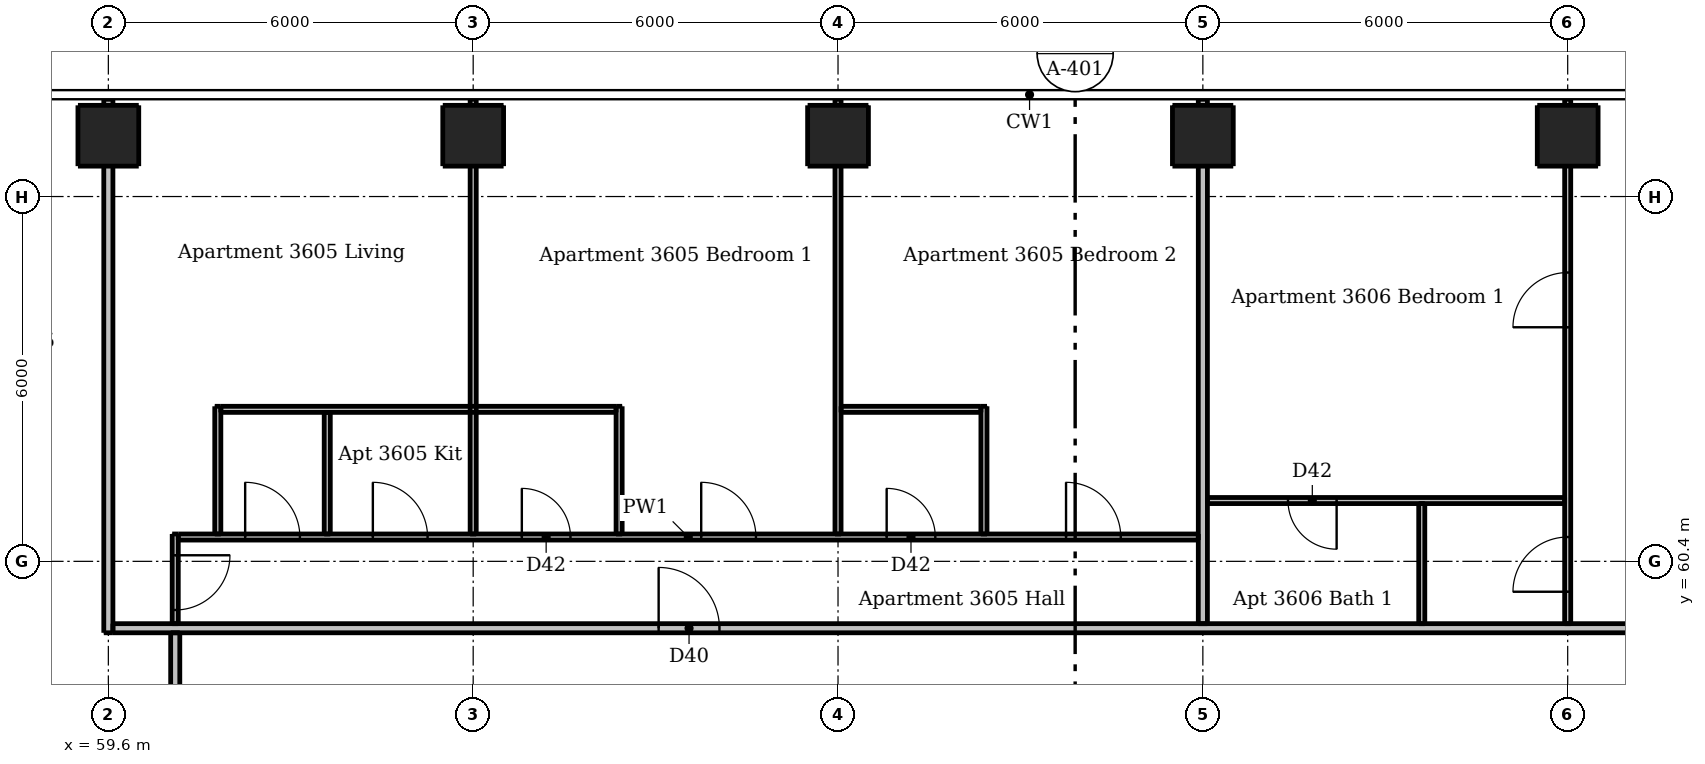
"""IFC4 building model, lengths in metres.
Left out: names, types, materials, properties, quantities, classifications, styles, units other than length and angle.
Written with IfcOpenShell. Run it as: python <this file> out.ifc"""

import sys

from ifc_helpers import new_model, si_unit, direction, frame, frame_2d, origin, origin_2d, place, context, subcontext, project, spatial, rectangle, extrude, element, fill, save


model = new_model("IFC4")
c1 = context("Model", 3, precision=1e-05, world=origin(), true_north=direction((0.0, 1.0)))
c2 = subcontext(c1, "Body", "Model", "MODEL_VIEW")
j1 = project(units=[si_unit("LENGTHUNIT", "METRE"), si_unit("PLANEANGLEUNIT", "RADIAN")], contexts=[c1])
p1 = place(None, origin())
s1 = spatial("IfcSite", under=j1, at=p1, CompositionType="ELEMENT")
p2 = place(p1, origin())
s2 = spatial("IfcBuilding", under=s1, at=p2, CompositionType="ELEMENT")
p3 = place(p2, frame((0.0, 0.0, 137.2)))
s3 = spatial("IfcBuildingStorey", under=s2, at=p3, CompositionType="ELEMENT", Elevation=137.2)
for number, where, z_axis, x_axis in (
    (1, (59.6, 67.4, 0.0), (0.0, 0.0, 1.0), (1.0, 0.0, 0.0)),
    (2, (65.6, 67.4, 0.0), (0.0, 0.0, 1.0), (1.0, 0.0, 0.0)),
    (3, (71.6, 67.4, 0.0), (0.0, 0.0, 1.0), (1.0, 0.0, 0.0)),
    (4, (77.6, 67.4, 0.0), (0.0, 0.0, 1.0), (1.0, 0.0, 0.0)),
    (5, (83.6, 67.4, 0.0), (0.0, 0.0, 1.0), (1.0, 0.0, 0.0)),
):
    element("IfcColumn", number, at=place(p3, frame(where, z_axis=z_axis, x_axis=x_axis)), inside=s3, PredefinedType="COLUMN", context=c2, shape_type="SweptSolid", body=[
        extrude(rectangle(XDim=1.0, YDim=1.0, at=origin_2d()), origin(), (0.0, 0.0, 1.0), 3.05),
    ])
p4 = place(p3, frame((60.7, 60.85, 0.0), z_axis=(0.0, 0.0, 1.0), x_axis=(0.0, -1.0, 0.0)))
e6 = element("IfcWall", 6, at=p4, inside=s3, PredefinedType="PARTITIONING", context=c2, shape_type="SweptSolid", body=[
    extrude(rectangle(XDim=1.475, YDim=0.1, at=frame_2d((0.738, 0.0))), origin(), (0.0, 0.0, 1.0), 3.05),
])
p5 = place(p4, frame((0.35, 0.0, 0.0)))
e7 = element("IfcOpeningElement", 7, at=p5, cuts=e6, PredefinedType="OPENING", context=c2, shape_type="SweptSolid", body=[
    extrude(rectangle(XDim=0.9, YDim=2.1, at=frame_2d((0.45, 1.05))), frame((0.0, 0.06, 0.0), z_axis=(0.0, -1.0, 0.0), x_axis=(1.0, 0.0, 0.0)), (0.0, 0.0, 1.0), 0.12),
])
p6 = place(p3, frame((61.4, 60.85, 0.0), z_axis=(0.0, 0.0, 1.0), x_axis=(0.0, 1.0, 0.0)))
e8 = element("IfcWall", 8, at=p6, inside=s3, PredefinedType="PARTITIONING", context=c2, shape_type="SweptSolid", body=[
    extrude(rectangle(XDim=2.1, YDim=0.1, at=frame_2d((1.05, 0.0))), origin(), (0.0, 0.0, 1.0), 3.05),
])
p7 = place(p3, frame((63.2, 60.85, 0.0), z_axis=(0.0, 0.0, 1.0), x_axis=(0.0, 1.0, 0.0)))
e9 = element("IfcWall", 9, at=p7, inside=s3, PredefinedType="PARTITIONING", context=c2, shape_type="SweptSolid", body=[
    extrude(rectangle(XDim=2.0, YDim=0.1, at=frame_2d((1.0, 0.0))), origin(), (0.0, 0.0, 1.0), 3.05),
])
p8 = place(p3, frame((65.6, 60.85, 0.0), z_axis=(0.0, 0.0, 1.0), x_axis=(0.0, 1.0, 0.0)))
e10 = element("IfcWall", 10, at=p8, inside=s3, PredefinedType="PARTITIONING", context=c2, shape_type="SweptSolid", body=[
    extrude(rectangle(XDim=7.15, YDim=0.1, at=frame_2d((3.575, 0.0))), origin(), (0.0, 0.0, 1.0), 2.516),
])
p9 = place(p3, frame((68.0, 60.85, 0.0), z_axis=(0.0, 0.0, 1.0), x_axis=(0.0, 1.0, 0.0)))
e11 = element("IfcWall", 11, at=p9, inside=s3, PredefinedType="PARTITIONING", context=c2, shape_type="SweptSolid", body=[
    extrude(rectangle(XDim=2.1, YDim=0.1, at=frame_2d((1.05, 0.0))), origin(), (0.0, 0.0, 1.0), 3.05),
])
p10 = place(p3, frame((71.6, 60.85, 0.0), z_axis=(0.0, 0.0, 1.0), x_axis=(0.0, 1.0, 0.0)))
e12 = element("IfcWall", 12, at=p10, inside=s3, PredefinedType="PARTITIONING", context=c2, shape_type="SweptSolid", body=[
    extrude(rectangle(XDim=7.15, YDim=0.1, at=frame_2d((3.575, 0.0))), origin(), (0.0, 0.0, 1.0), 2.516),
])
p11 = place(p3, frame((74.0, 60.85, 0.0), z_axis=(0.0, 0.0, 1.0), x_axis=(0.0, 1.0, 0.0)))
e13 = element("IfcWall", 13, at=p11, inside=s3, PredefinedType="PARTITIONING", context=c2, shape_type="SweptSolid", body=[
    extrude(rectangle(XDim=2.1, YDim=0.1, at=frame_2d((1.05, 0.0))), origin(), (0.0, 0.0, 1.0), 3.05),
])
p12 = place(p3, frame((81.2, 59.375, 0.0), z_axis=(0.0, 0.0, 1.0), x_axis=(0.0, 1.0, 0.0)))
e14 = element("IfcWall", 14, at=p12, inside=s3, PredefinedType="PARTITIONING", context=c2, shape_type="SweptSolid", body=[
    extrude(rectangle(XDim=1.975, YDim=0.1, at=frame_2d((0.988, 0.0))), origin(), (0.0, 0.0, 1.0), 3.05),
])
p13 = place(p3, frame((83.6, 59.375, 0.0), z_axis=(0.0, 0.0, 1.0), x_axis=(0.0, 1.0, 0.0)))
e15 = element("IfcWall", 15, at=p13, inside=s3, PredefinedType="PARTITIONING", context=c2, shape_type="SweptSolid", body=[
    extrude(rectangle(XDim=8.625, YDim=0.1, at=frame_2d((4.312, 0.0))), origin(), (0.0, 0.0, 1.0), 2.516),
])
p14 = place(p13, frame((0.525, 0.0, 0.0)))
e16 = element("IfcOpeningElement", 16, at=p14, cuts=e15, PredefinedType="OPENING", context=c2, shape_type="SweptSolid", body=[
    extrude(rectangle(XDim=0.9, YDim=2.1, at=frame_2d((0.45, 1.05))), frame((0.0, 0.06, 0.0), z_axis=(0.0, -1.0, 0.0), x_axis=(1.0, 0.0, 0.0)), (0.0, 0.0, 1.0), 0.12),
])
p15 = place(p13, frame((4.875, 0.0, 0.0)))
e17 = element("IfcOpeningElement", 17, at=p15, cuts=e15, PredefinedType="OPENING", context=c2, shape_type="SweptSolid", body=[
    extrude(rectangle(XDim=0.9, YDim=2.1, at=frame_2d((0.45, 1.05))), frame((0.0, 0.06, 0.0), z_axis=(0.0, -1.0, 0.0), x_axis=(1.0, 0.0, 0.0)), (0.0, 0.0, 1.0), 0.12),
])
p16 = place(p3, frame((61.45, 62.9, 0.0), z_axis=(0.0, 0.0, 1.0), x_axis=(1.0, 0.0, 0.0)))
e18 = element("IfcWall", 18, at=p16, inside=s3, PredefinedType="PARTITIONING", context=c2, shape_type="SweptSolid", body=[
    extrude(rectangle(XDim=6.5, YDim=0.1, at=frame_2d((3.25, 0.0))), origin(), (0.0, 0.0, 1.0), 3.05),
])
p17 = place(p3, frame((71.65, 62.9, 0.0), z_axis=(0.0, 0.0, 1.0), x_axis=(1.0, 0.0, 0.0)))
e19 = element("IfcWall", 19, at=p17, inside=s3, PredefinedType="PARTITIONING", context=c2, shape_type="SweptSolid", body=[
    extrude(rectangle(XDim=2.3, YDim=0.1, at=frame_2d((1.15, 0.0))), origin(), (0.0, 0.0, 1.0), 3.05),
])
p18 = place(p3, frame((83.55, 61.4, 0.0), z_axis=(0.0, 0.0, 1.0), x_axis=(-1.0, 0.0, 0.0)))
e20 = element("IfcWall", 20, at=p18, inside=s3, PredefinedType="PARTITIONING", context=c2, shape_type="SweptSolid", body=[
    extrude(rectangle(XDim=5.875, YDim=0.1, at=frame_2d((2.938, 0.0))), origin(), (0.0, 0.0, 1.0), 3.05),
])
p19 = place(p18, frame((3.75, 0.0, 0.0)))
e21 = element("IfcOpeningElement", 21, at=p19, cuts=e20, PredefinedType="OPENING", context=c2, shape_type="SweptSolid", body=[
    extrude(rectangle(XDim=0.8, YDim=2.1, at=frame_2d((0.4, 1.05))), frame((0.0, 0.06, 0.0), z_axis=(0.0, -1.0, 0.0), x_axis=(1.0, 0.0, 0.0)), (0.0, 0.0, 1.0), 0.12),
])
p20 = place(p3, frame((60.75, 60.8, 0.0), z_axis=(0.0, 0.0, 1.0), x_axis=(1.0, 0.0, 0.0)))
e22 = element("IfcWall", 22, at=p20, inside=s3, PredefinedType="PARTITIONING", context=c2, shape_type="SweptSolid", body=[
    extrude(rectangle(XDim=16.775, YDim=0.1, at=frame_2d((8.387, 0.0))), origin(), (0.0, 0.0, 1.0), 3.05),
])
p21 = place(p20, frame((3.2, 0.0, 0.0)))
e23 = element("IfcOpeningElement", 23, at=p21, cuts=e22, PredefinedType="OPENING", context=c2, shape_type="SweptSolid", body=[
    extrude(rectangle(XDim=0.9, YDim=2.1, at=frame_2d((0.45, 1.05))), frame((0.0, 0.06, 0.0), z_axis=(0.0, -1.0, 0.0), x_axis=(1.0, 0.0, 0.0)), (0.0, 0.0, 1.0), 0.12),
])
p22 = place(p20, frame((1.1, 0.0, 0.0)))
e24 = element("IfcOpeningElement", 24, at=p22, cuts=e22, PredefinedType="OPENING", context=c2, shape_type="SweptSolid", body=[
    extrude(rectangle(XDim=0.9, YDim=2.1, at=frame_2d((0.45, 1.05))), frame((0.0, 0.06, 0.0), z_axis=(0.0, -1.0, 0.0), x_axis=(1.0, 0.0, 0.0)), (0.0, 0.0, 1.0), 0.12),
])
p23 = place(p20, frame((8.6, 0.0, 0.0)))
e25 = element("IfcOpeningElement", 25, at=p23, cuts=e22, PredefinedType="OPENING", context=c2, shape_type="SweptSolid", body=[
    extrude(rectangle(XDim=0.9, YDim=2.1, at=frame_2d((0.45, 1.05))), frame((0.0, 0.06, 0.0), z_axis=(0.0, -1.0, 0.0), x_axis=(1.0, 0.0, 0.0)), (0.0, 0.0, 1.0), 0.12),
])
p24 = place(p20, frame((14.6, 0.0, 0.0)))
e26 = element("IfcOpeningElement", 26, at=p24, cuts=e22, PredefinedType="OPENING", context=c2, shape_type="SweptSolid", body=[
    extrude(rectangle(XDim=0.9, YDim=2.1, at=frame_2d((0.45, 1.05))), frame((0.0, 0.06, 0.0), z_axis=(0.0, -1.0, 0.0), x_axis=(1.0, 0.0, 0.0)), (0.0, 0.0, 1.0), 0.12),
])
p25 = place(p20, frame((5.65, 0.0, 0.0)))
e27 = element("IfcOpeningElement", 27, at=p25, cuts=e22, PredefinedType="OPENING", context=c2, shape_type="SweptSolid", body=[
    extrude(rectangle(XDim=0.8, YDim=2.1, at=frame_2d((0.4, 1.05))), frame((0.0, 0.06, 0.0), z_axis=(0.0, -1.0, 0.0), x_axis=(1.0, 0.0, 0.0)), (0.0, 0.0, 1.0), 0.12),
])
p26 = place(p20, frame((11.65, 0.0, 0.0)))
e28 = element("IfcOpeningElement", 28, at=p26, cuts=e22, PredefinedType="OPENING", context=c2, shape_type="SweptSolid", body=[
    extrude(rectangle(XDim=0.8, YDim=2.1, at=frame_2d((0.4, 1.05))), frame((0.0, 0.06, 0.0), z_axis=(0.0, -1.0, 0.0), x_axis=(1.0, 0.0, 0.0)), (0.0, 0.0, 1.0), 0.12),
])
p27 = place(p3, frame((59.6, 59.225, 0.0), z_axis=(0.0, 0.0, 1.0), x_axis=(0.0, 1.0, 0.0)))
e29 = element("IfcWall", 29, at=p27, inside=s3, PredefinedType="PARTITIONING", context=c2, shape_type="SweptSolid", body=[
    extrude(rectangle(XDim=8.775, YDim=0.15, at=frame_2d((4.387, 0.0))), origin(), (0.0, 0.0, 1.0), 2.51),
])
p28 = place(p3, frame((60.7, 30.325, 0.0), z_axis=(0.0, 0.0, 1.0), x_axis=(0.0, 1.0, 0.0)))
e30 = element("IfcWall", 30, at=p28, inside=s3, PredefinedType="PARTITIONING", context=c2, shape_type="SweptSolid", body=[
    extrude(rectangle(XDim=28.9, YDim=0.15, at=frame_2d((14.45, 0.0))), origin(), (0.0, 0.0, 1.0), 3.05),
])
p29 = place(p28, frame((9.225, 0.0, 0.0)))
e31 = element("IfcOpeningElement", 31, at=p29, cuts=e30, PredefinedType="OPENING", context=c2, shape_type="SweptSolid", body=[
    extrude(rectangle(XDim=1.0, YDim=2.1, at=frame_2d((0.5, 1.05))), frame((0.0, 0.085, 0.0), z_axis=(0.0, -1.0, 0.0), x_axis=(1.0, 0.0, 0.0)), (0.0, 0.0, 1.0), 0.17),
])
p30 = place(p28, frame((26.025, 0.0, 0.0)))
e32 = element("IfcOpeningElement", 32, at=p30, cuts=e30, PredefinedType="OPENING", context=c2, shape_type="SweptSolid", body=[
    extrude(rectangle(XDim=1.0, YDim=2.1, at=frame_2d((0.5, 1.05))), frame((0.0, 0.085, 0.0), z_axis=(0.0, -1.0, 0.0), x_axis=(1.0, 0.0, 0.0)), (0.0, 0.0, 1.0), 0.17),
])
p31 = place(p3, frame((77.6, 59.375, 0.0), z_axis=(0.0, 0.0, 1.0), x_axis=(0.0, 1.0, 0.0)))
e33 = element("IfcWall", 33, at=p31, inside=s3, PredefinedType="PARTITIONING", context=c2, shape_type="SweptSolid", body=[
    extrude(rectangle(XDim=8.625, YDim=0.15, at=frame_2d((4.312, 0.0))), origin(), (0.0, 0.0, 1.0), 2.516),
])
p32 = place(p3, frame((59.675, 59.3, 0.0), z_axis=(0.0, 0.0, 1.0), x_axis=(1.0, 0.0, 0.0)))
e34 = element("IfcWall", 34, at=p32, inside=s3, PredefinedType="PARTITIONING", context=c2, shape_type="SweptSolid", body=[
    extrude(rectangle(XDim=28.55, YDim=0.15, at=frame_2d((14.275, 0.0))), origin(), (0.0, 0.0, 1.0), 3.05),
])
p33 = place(p32, frame((8.975, 0.0, 0.0)))
e35 = element("IfcOpeningElement", 35, at=p33, cuts=e34, PredefinedType="OPENING", context=c2, shape_type="SweptSolid", body=[
    extrude(rectangle(XDim=1.0, YDim=2.1, at=frame_2d((0.5, 1.05))), frame((0.0, 0.085, 0.0), z_axis=(0.0, -1.0, 0.0), x_axis=(1.0, 0.0, 0.0)), (0.0, 0.0, 1.0), 0.17),
])
p34 = place(p32, frame((25.775, 0.0, 0.0)))
e36 = element("IfcOpeningElement", 36, at=p34, cuts=e34, PredefinedType="OPENING", context=c2, shape_type="SweptSolid", body=[
    extrude(rectangle(XDim=1.0, YDim=2.1, at=frame_2d((0.5, 1.05))), frame((0.0, 0.085, 0.0), z_axis=(0.0, -1.0, 0.0), x_axis=(1.0, 0.0, 0.0)), (0.0, 0.0, 1.0), 0.17),
])
p35 = place(p33, origin())
e37 = element("IfcDoor", 37, at=p35, inside=s3, OperationType="SINGLE_SWING_LEFT", PredefinedType="DOOR", context=c2, shape_type="SweptSolid", body=[
    extrude(rectangle(XDim=1.0, YDim=2.1, at=frame_2d((0.5, 1.05))), frame((0.0, 0.025, 0.0), z_axis=(0.0, -1.0, 0.0), x_axis=(1.0, 0.0, 0.0)), (0.0, 0.0, 1.0), 0.05),
])
fill(e35, e37)
p36 = place(p5, origin())
e38 = element("IfcDoor", 38, at=p36, inside=s3, OperationType="SINGLE_SWING_LEFT", PredefinedType="DOOR", context=c2, shape_type="SweptSolid", body=[
    extrude(rectangle(XDim=0.9, YDim=2.1, at=frame_2d((0.45, 1.05))), frame((0.0, 0.025, 0.0), z_axis=(0.0, -1.0, 0.0), x_axis=(1.0, 0.0, 0.0)), (0.0, 0.0, 1.0), 0.05),
])
fill(e7, e38)
p37 = place(p21, origin())
e39 = element("IfcDoor", 39, at=p37, inside=s3, OperationType="SINGLE_SWING_LEFT", PredefinedType="DOOR", context=c2, shape_type="SweptSolid", body=[
    extrude(rectangle(XDim=0.9, YDim=2.1, at=frame_2d((0.45, 1.05))), frame((0.0, 0.025, 0.0), z_axis=(0.0, -1.0, 0.0), x_axis=(1.0, 0.0, 0.0)), (0.0, 0.0, 1.0), 0.05),
])
fill(e23, e39)
p38 = place(p22, origin())
e40 = element("IfcDoor", 40, at=p38, inside=s3, OperationType="SINGLE_SWING_LEFT", PredefinedType="DOOR", context=c2, shape_type="SweptSolid", body=[
    extrude(rectangle(XDim=0.9, YDim=2.1, at=frame_2d((0.45, 1.05))), frame((0.0, 0.025, 0.0), z_axis=(0.0, -1.0, 0.0), x_axis=(1.0, 0.0, 0.0)), (0.0, 0.0, 1.0), 0.05),
])
fill(e24, e40)
p39 = place(p23, origin())
e41 = element("IfcDoor", 41, at=p39, inside=s3, OperationType="SINGLE_SWING_LEFT", PredefinedType="DOOR", context=c2, shape_type="SweptSolid", body=[
    extrude(rectangle(XDim=0.9, YDim=2.1, at=frame_2d((0.45, 1.05))), frame((0.0, 0.025, 0.0), z_axis=(0.0, -1.0, 0.0), x_axis=(1.0, 0.0, 0.0)), (0.0, 0.0, 1.0), 0.05),
])
fill(e25, e41)
p40 = place(p24, origin())
e42 = element("IfcDoor", 42, at=p40, inside=s3, OperationType="SINGLE_SWING_LEFT", PredefinedType="DOOR", context=c2, shape_type="SweptSolid", body=[
    extrude(rectangle(XDim=0.9, YDim=2.1, at=frame_2d((0.45, 1.05))), frame((0.0, 0.025, 0.0), z_axis=(0.0, -1.0, 0.0), x_axis=(1.0, 0.0, 0.0)), (0.0, 0.0, 1.0), 0.05),
])
fill(e26, e42)
p41 = place(p25, origin())
e43 = element("IfcDoor", 43, at=p41, inside=s3, OperationType="SINGLE_SWING_LEFT", PredefinedType="DOOR", context=c2, shape_type="SweptSolid", body=[
    extrude(rectangle(XDim=0.8, YDim=2.1, at=frame_2d((0.4, 1.05))), frame((0.0, 0.025, 0.0), z_axis=(0.0, -1.0, 0.0), x_axis=(1.0, 0.0, 0.0)), (0.0, 0.0, 1.0), 0.05),
])
fill(e27, e43)
p42 = place(p26, origin())
e44 = element("IfcDoor", 44, at=p42, inside=s3, OperationType="SINGLE_SWING_LEFT", PredefinedType="DOOR", context=c2, shape_type="SweptSolid", body=[
    extrude(rectangle(XDim=0.8, YDim=2.1, at=frame_2d((0.4, 1.05))), frame((0.0, 0.025, 0.0), z_axis=(0.0, -1.0, 0.0), x_axis=(1.0, 0.0, 0.0)), (0.0, 0.0, 1.0), 0.05),
])
fill(e28, e44)
p43 = place(p14, origin())
e45 = element("IfcDoor", 45, at=p43, inside=s3, OperationType="SINGLE_SWING_LEFT", PredefinedType="DOOR", context=c2, shape_type="SweptSolid", body=[
    extrude(rectangle(XDim=0.9, YDim=2.1, at=frame_2d((0.45, 1.05))), frame((0.0, 0.025, 0.0), z_axis=(0.0, -1.0, 0.0), x_axis=(1.0, 0.0, 0.0)), (0.0, 0.0, 1.0), 0.05),
])
fill(e16, e45)
p44 = place(p15, origin())
e46 = element("IfcDoor", 46, at=p44, inside=s3, OperationType="SINGLE_SWING_LEFT", PredefinedType="DOOR", context=c2, shape_type="SweptSolid", body=[
    extrude(rectangle(XDim=0.9, YDim=2.1, at=frame_2d((0.45, 1.05))), frame((0.0, 0.025, 0.0), z_axis=(0.0, -1.0, 0.0), x_axis=(1.0, 0.0, 0.0)), (0.0, 0.0, 1.0), 0.05),
])
fill(e17, e46)
p45 = place(p19, origin())
e47 = element("IfcDoor", 47, at=p45, inside=s3, OperationType="SINGLE_SWING_LEFT", PredefinedType="DOOR", context=c2, shape_type="SweptSolid", body=[
    extrude(rectangle(XDim=0.8, YDim=2.1, at=frame_2d((0.4, 1.05))), frame((0.0, 0.025, 0.0), z_axis=(0.0, -1.0, 0.0), x_axis=(1.0, 0.0, 0.0)), (0.0, 0.0, 1.0), 0.05),
])
fill(e21, e47)
save(model, sys.argv[1])
